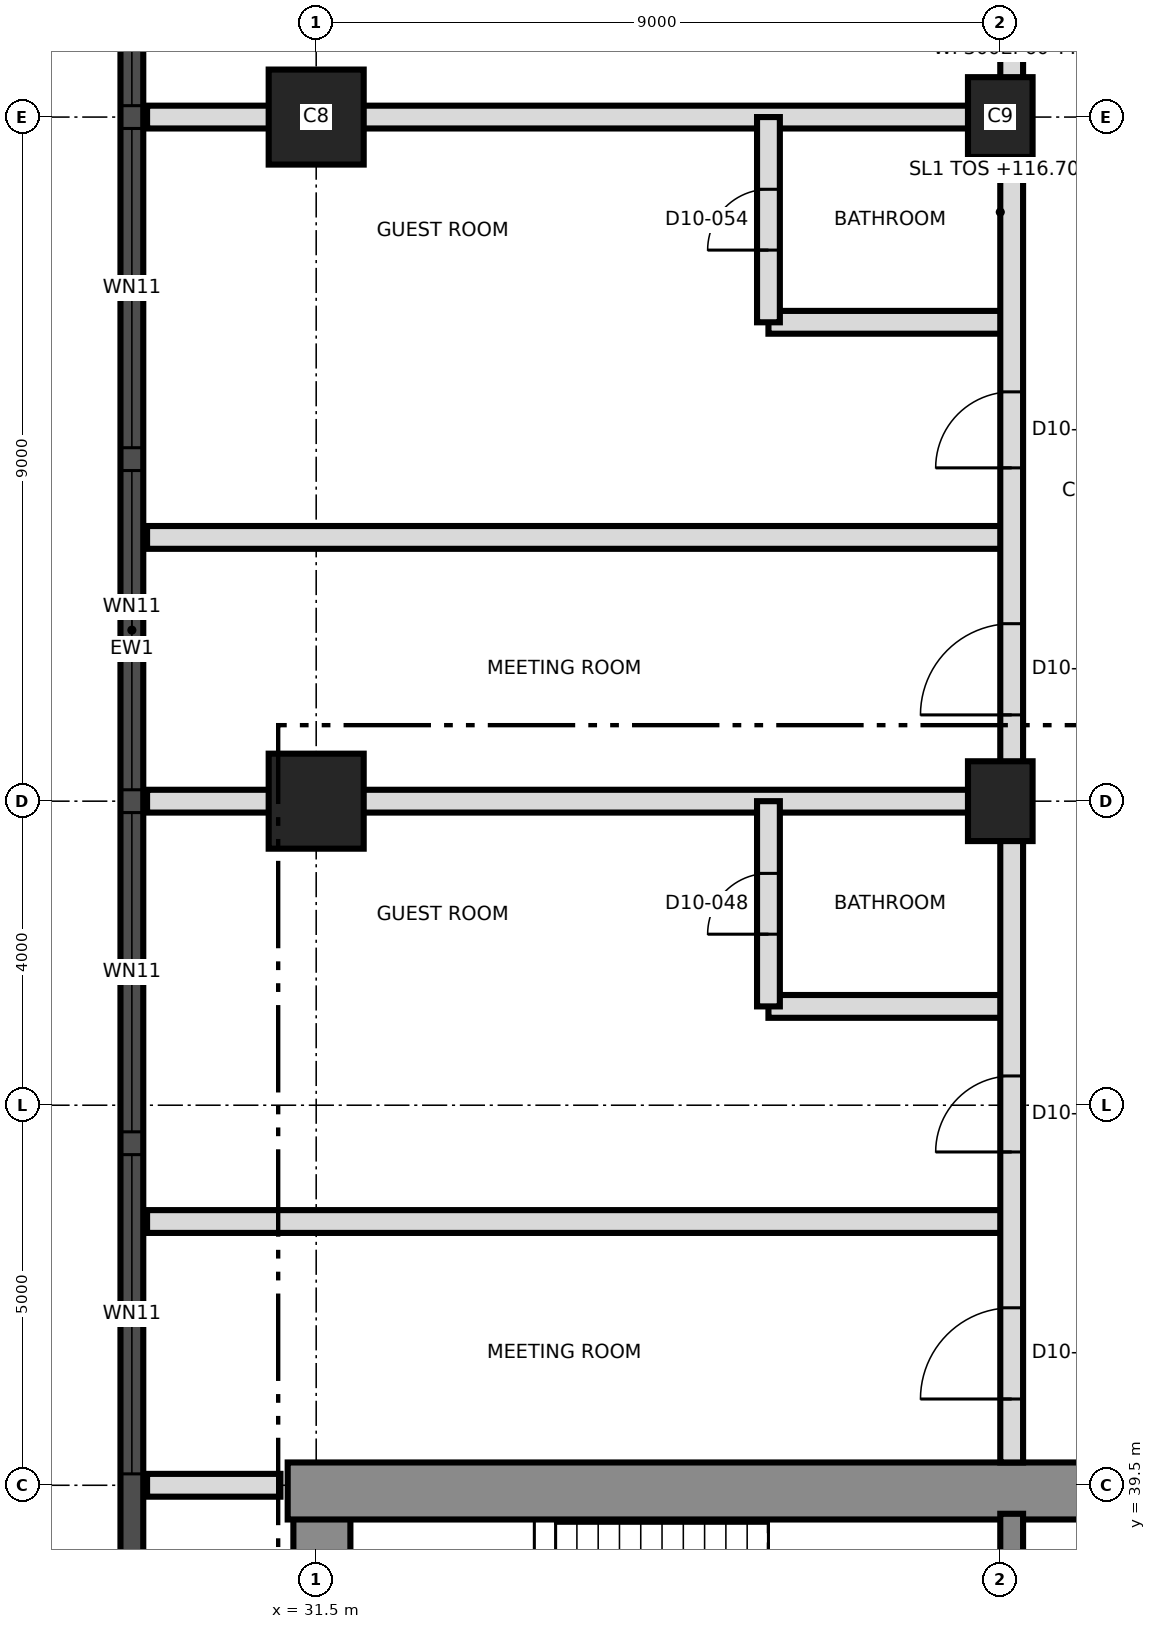
"""IFC4 building model, lengths in metres.
Left out: names, types, materials, properties, quantities, classifications, styles, units other than length and angle.
Written with IfcOpenShell. Run it as: python <this file> out.ifc"""

import sys

from ifc_helpers import new_model, si_unit, direction, frame, frame_2d, origin, origin_2d, place, context, subcontext, project, spatial, rectangle, extrude, element, fill, save


model = new_model("IFC4")
c1 = context("Model", 3, precision=1e-05, world=origin(), true_north=direction((0.0, 1.0)))
c2 = subcontext(c1, "Body", "Model", "MODEL_VIEW")
j1 = project(units=[si_unit("LENGTHUNIT", "METRE"), si_unit("PLANEANGLEUNIT", "RADIAN")], contexts=[c1])
p1 = place(None, origin())
s1 = spatial("IfcSite", under=j1, at=p1, CompositionType="ELEMENT")
p2 = place(p1, origin())
s2 = spatial("IfcBuilding", under=s1, at=p2, CompositionType="ELEMENT")
p3 = place(p2, frame((0.0, 0.0, 116.7)))
s3 = spatial("IfcBuildingStorey", under=s2, at=p3, CompositionType="ELEMENT", Elevation=116.7)
p4 = place(p3, frame((31.575, 21.875, 0.0), z_axis=(0.0, 0.0, 1.0), x_axis=(0.0, 1.0, 0.0)))
e1 = element("IfcWall", 1, at=p4, inside=s3, PredefinedType="SHEAR", context=c2, shape_type="SweptSolid", body=[
    extrude(rectangle(XDim=17.25, YDim=0.75, at=frame_2d((8.625, 0.0))), origin(), (0.0, 0.0, 1.0), 3.7),
])
p5 = place(p3, frame((31.125, 39.425, 0.0), z_axis=(0.0, 0.0, 1.0), x_axis=(1.0, 0.0, 0.0)))
e2 = element("IfcWall", 2, at=p5, inside=s3, PredefinedType="SHEAR", context=c2, shape_type="SweptSolid", body=[
    extrude(rectangle(XDim=27.0, YDim=0.75, at=frame_2d((13.5, 0.0))), origin(), (0.0, 0.0, 1.0), 3.7),
])
p6 = place(p5, frame((10.575, 0.0, 0.0)))
e3 = element("IfcOpeningElement", 3, at=p6, cuts=e2, PredefinedType="OPENING", context=c2, shape_type="SweptSolid", body=[
    extrude(rectangle(XDim=1.2, YDim=2.1, at=frame_2d((0.6, 1.05))), frame((0.0, 0.385, 0.0), z_axis=(0.0, -1.0, 0.0), x_axis=(1.0, 0.0, 0.0)), (0.0, 0.0, 1.0), 0.77),
])
p7 = place(p3, frame((40.65, 33.5, 0.0), z_axis=(0.0, 0.0, 1.0), x_axis=(0.0, 1.0, 0.0)))
e4 = element("IfcWall", 4, at=p7, inside=s3, PredefinedType="SHEAR", context=c2, shape_type="SweptSolid", body=[
    extrude(rectangle(XDim=5.625, YDim=0.3, at=frame_2d((2.812, 0.0))), origin(), (0.0, 0.0, 1.0), 3.7),
])
p8 = place(p3, frame((31.5, 48.5, 0.0), z_axis=(0.0, 0.0, 1.0), x_axis=(1.0, 0.0, 0.0)))
e5 = element("IfcColumn", 5, at=p8, inside=s3, PredefinedType="COLUMN", context=c2, shape_type="SweptSolid", body=[
    extrude(rectangle(XDim=1.25, YDim=1.25, at=origin_2d()), origin(), (0.0, 0.0, 1.0), 3.7),
])
p9 = place(p3, frame((40.5, 48.5, 0.0), z_axis=(0.0, 0.0, 1.0), x_axis=(0.0, 1.0, 0.0)))
e6 = element("IfcColumn", 6, at=p9, inside=s3, PredefinedType="COLUMN", context=c2, shape_type="SweptSolid", body=[
    extrude(rectangle(XDim=1.05, YDim=0.85, at=origin_2d()), origin(), (0.0, 0.0, 1.0), 3.7),
])
p10 = place(p3, frame((31.5, 57.5, 0.0), z_axis=(0.0, 0.0, 1.0), x_axis=(1.0, 0.0, 0.0)))
e7 = element("IfcColumn", 7, at=p10, inside=s3, PredefinedType="COLUMN", context=c2, shape_type="SweptSolid", body=[
    extrude(rectangle(XDim=1.25, YDim=1.25, at=origin_2d()), origin(), (0.0, 0.0, 1.0), 3.7),
])
p11 = place(p3, frame((40.5, 57.5, 0.0), z_axis=(0.0, 0.0, 1.0), x_axis=(0.0, 1.0, 0.0)))
e8 = element("IfcColumn", 8, at=p11, inside=s3, PredefinedType="COLUMN", context=c2, shape_type="SweptSolid", body=[
    extrude(rectangle(XDim=1.05, YDim=0.85, at=origin_2d()), origin(), (0.0, 0.0, 1.0), 3.7),
])
p12 = place(p3, frame((29.075, 66.986, 0.0), z_axis=(0.0, 0.0, 1.0), x_axis=(0.0, -1.0, 0.0)))
e9 = element("IfcWall", 9, at=p12, inside=s3, PredefinedType="SOLIDWALL", context=c2, shape_type="SweptSolid", body=[
    extrude(rectangle(XDim=32.976, YDim=0.3, at=frame_2d((16.488, 0.0))), origin(), (0.0, 0.0, 1.0), 3.4),
])
p13 = place(p12, frame((1.593, 0.0, 0.3)))
e10 = element("IfcOpeningElement", 10, at=p13, cuts=e9, PredefinedType="OPENING", context=c2, shape_type="SweptSolid", body=[
    extrude(rectangle(XDim=1.8, YDim=2.4, at=frame_2d((0.9, 1.2))), frame((0.0, 0.16, 0.0), z_axis=(0.0, -1.0, 0.0), x_axis=(1.0, 0.0, 0.0)), (0.0, 0.0, 1.0), 0.32),
])
p14 = place(p12, frame((5.136, 0.0, 0.9)))
e11 = element("IfcOpeningElement", 11, at=p14, cuts=e9, PredefinedType="OPENING", context=c2, shape_type="SweptSolid", body=[
    extrude(rectangle(XDim=4.2, YDim=1.5, at=frame_2d((2.1, 0.75))), frame((0.0, 0.16, 0.0), z_axis=(0.0, -1.0, 0.0), x_axis=(1.0, 0.0, 0.0)), (0.0, 0.0, 1.0), 0.32),
])
p15 = place(p12, frame((9.636, 0.0, 0.9)))
e12 = element("IfcOpeningElement", 12, at=p15, cuts=e9, PredefinedType="OPENING", context=c2, shape_type="SweptSolid", body=[
    extrude(rectangle(XDim=4.2, YDim=1.5, at=frame_2d((2.1, 0.75))), frame((0.0, 0.16, 0.0), z_axis=(0.0, -1.0, 0.0), x_axis=(1.0, 0.0, 0.0)), (0.0, 0.0, 1.0), 0.32),
])
p16 = place(p12, frame((14.136, 0.0, 0.9)))
e13 = element("IfcOpeningElement", 13, at=p16, cuts=e9, PredefinedType="OPENING", context=c2, shape_type="SweptSolid", body=[
    extrude(rectangle(XDim=4.2, YDim=1.5, at=frame_2d((2.1, 0.75))), frame((0.0, 0.16, 0.0), z_axis=(0.0, -1.0, 0.0), x_axis=(1.0, 0.0, 0.0)), (0.0, 0.0, 1.0), 0.32),
])
p17 = place(p12, frame((18.636, 0.0, 0.9)))
e14 = element("IfcOpeningElement", 14, at=p17, cuts=e9, PredefinedType="OPENING", context=c2, shape_type="SweptSolid", body=[
    extrude(rectangle(XDim=4.2, YDim=1.5, at=frame_2d((2.1, 0.75))), frame((0.0, 0.16, 0.0), z_axis=(0.0, -1.0, 0.0), x_axis=(1.0, 0.0, 0.0)), (0.0, 0.0, 1.0), 0.32),
])
p18 = place(p12, frame((23.136, 0.0, 0.9)))
e15 = element("IfcOpeningElement", 15, at=p18, cuts=e9, PredefinedType="OPENING", context=c2, shape_type="SweptSolid", body=[
    extrude(rectangle(XDim=4.2, YDim=1.5, at=frame_2d((2.1, 0.75))), frame((0.0, 0.16, 0.0), z_axis=(0.0, -1.0, 0.0), x_axis=(1.0, 0.0, 0.0)), (0.0, 0.0, 1.0), 0.32),
])
p19 = place(p12, frame((29.331, 0.0, 0.3)))
e16 = element("IfcOpeningElement", 16, at=p19, cuts=e9, PredefinedType="OPENING", context=c2, shape_type="SweptSolid", body=[
    extrude(rectangle(XDim=1.8, YDim=2.4, at=frame_2d((0.9, 1.2))), frame((0.0, 0.16, 0.0), z_axis=(0.0, -1.0, 0.0), x_axis=(1.0, 0.0, 0.0)), (0.0, 0.0, 1.0), 0.32),
])
p20 = place(p3, frame((29.275, 39.5, 0.0), z_axis=(0.0, 0.0, 1.0), x_axis=(1.0, 0.0, 0.0)))
e17 = element("IfcWall", 17, at=p20, inside=s3, PredefinedType="PARTITIONING", context=c2, shape_type="SweptSolid", body=[
    extrude(rectangle(XDim=1.755, YDim=0.3, at=frame_2d((0.877, 0.0))), origin(), (0.0, 0.0, 1.0), 3.4),
])
p21 = place(p3, frame((29.275, 42.97, 0.0), z_axis=(0.0, 0.0, 1.0), x_axis=(1.0, 0.0, 0.0)))
e18 = element("IfcWall", 18, at=p21, inside=s3, PredefinedType="PARTITIONING", context=c2, shape_type="SweptSolid", body=[
    extrude(rectangle(XDim=11.375, YDim=0.3, at=frame_2d((5.688, 0.0))), origin(), (0.0, 0.0, 1.0), 3.4),
])
p22 = place(p3, frame((37.45, 45.8, 0.0), z_axis=(0.0, 0.0, 1.0), x_axis=(1.0, 0.0, 0.0)))
e19 = element("IfcWall", 19, at=p22, inside=s3, PredefinedType="PARTITIONING", context=c2, shape_type="SweptSolid", body=[
    extrude(rectangle(XDim=3.2, YDim=0.3, at=frame_2d((1.6, 0.0))), origin(), (0.0, 0.0, 1.0), 3.4),
])
for number, where, z_axis, x_axis in (
    (20, (29.275, 48.5, 0.0), (0.0, 0.0, 1.0), (1.0, 0.0, 0.0)),
    (21, (29.275, 51.97, 0.0), (0.0, 0.0, 1.0), (1.0, 0.0, 0.0)),
):
    element("IfcWall", number, at=place(p3, frame(where, z_axis=z_axis, x_axis=x_axis)), inside=s3, PredefinedType="PARTITIONING", context=c2, shape_type="SweptSolid", body=[
        extrude(rectangle(XDim=11.375, YDim=0.3, at=frame_2d((5.688, 0.0))), origin(), (0.0, 0.0, 1.0), 3.4),
    ])
p23 = place(p3, frame((37.45, 54.8, 0.0), z_axis=(0.0, 0.0, 1.0), x_axis=(1.0, 0.0, 0.0)))
e22 = element("IfcWall", 22, at=p23, inside=s3, PredefinedType="PARTITIONING", context=c2, shape_type="SweptSolid", body=[
    extrude(rectangle(XDim=3.2, YDim=0.3, at=frame_2d((1.6, 0.0))), origin(), (0.0, 0.0, 1.0), 3.4),
])
p24 = place(p3, frame((29.275, 57.5, 0.0), z_axis=(0.0, 0.0, 1.0), x_axis=(1.0, 0.0, 0.0)))
e23 = element("IfcWall", 23, at=p24, inside=s3, PredefinedType="PARTITIONING", context=c2, shape_type="SweptSolid", body=[
    extrude(rectangle(XDim=11.375, YDim=0.3, at=frame_2d((5.688, 0.0))), origin(), (0.0, 0.0, 1.0), 3.4),
])
p25 = place(p3, frame((37.45, 45.8, 0.0), z_axis=(0.0, 0.0, 1.0), x_axis=(0.0, 1.0, 0.0)))
e24 = element("IfcWall", 24, at=p25, inside=s3, PredefinedType="PARTITIONING", context=c2, shape_type="SweptSolid", body=[
    extrude(rectangle(XDim=2.7, YDim=0.3, at=frame_2d((1.35, 0.0))), origin(), (0.0, 0.0, 1.0), 3.4),
])
p26 = place(p25, frame((0.95, 0.0, 0.0)))
e25 = element("IfcOpeningElement", 25, at=p26, cuts=e24, PredefinedType="OPENING", context=c2, shape_type="SweptSolid", body=[
    extrude(rectangle(XDim=0.8, YDim=2.1, at=frame_2d((0.4, 1.05))), frame((0.0, 0.16, 0.0), z_axis=(0.0, -1.0, 0.0), x_axis=(1.0, 0.0, 0.0)), (0.0, 0.0, 1.0), 0.32),
])
p27 = place(p3, frame((37.45, 54.8, 0.0), z_axis=(0.0, 0.0, 1.0), x_axis=(0.0, 1.0, 0.0)))
e26 = element("IfcWall", 26, at=p27, inside=s3, PredefinedType="PARTITIONING", context=c2, shape_type="SweptSolid", body=[
    extrude(rectangle(XDim=2.7, YDim=0.3, at=frame_2d((1.35, 0.0))), origin(), (0.0, 0.0, 1.0), 3.4),
])
p28 = place(p27, frame((0.95, 0.0, 0.0)))
e27 = element("IfcOpeningElement", 27, at=p28, cuts=e26, PredefinedType="OPENING", context=c2, shape_type="SweptSolid", body=[
    extrude(rectangle(XDim=0.8, YDim=2.1, at=frame_2d((0.4, 1.05))), frame((0.0, 0.16, 0.0), z_axis=(0.0, -1.0, 0.0), x_axis=(1.0, 0.0, 0.0)), (0.0, 0.0, 1.0), 0.32),
])
p29 = place(p3, frame((40.65, 39.8, 0.0), z_axis=(0.0, 0.0, 1.0), x_axis=(0.0, 1.0, 0.0)))
e28 = element("IfcWall", 28, at=p29, inside=s3, PredefinedType="PARTITIONING", context=c2, shape_type="SweptSolid", body=[
    extrude(rectangle(XDim=37.2, YDim=0.3, at=frame_2d((18.6, 0.0))), origin(), (0.0, 0.0, 1.0), 3.4),
])
p30 = place(p29, frame((0.835, 0.0, 0.0)))
e29 = element("IfcOpeningElement", 29, at=p30, cuts=e28, PredefinedType="OPENING", context=c2, shape_type="SweptSolid", body=[
    extrude(rectangle(XDim=1.2, YDim=2.1, at=frame_2d((0.6, 1.05))), frame((0.0, 0.16, 0.0), z_axis=(0.0, -1.0, 0.0), x_axis=(1.0, 0.0, 0.0)), (0.0, 0.0, 1.0), 0.32),
])
p31 = place(p29, frame((4.085, 0.0, 0.0)))
e30 = element("IfcOpeningElement", 30, at=p31, cuts=e28, PredefinedType="OPENING", context=c2, shape_type="SweptSolid", body=[
    extrude(rectangle(XDim=1.0, YDim=2.1, at=frame_2d((0.5, 1.05))), frame((0.0, 0.16, 0.0), z_axis=(0.0, -1.0, 0.0), x_axis=(1.0, 0.0, 0.0)), (0.0, 0.0, 1.0), 0.32),
])
p32 = place(p29, frame((9.835, 0.0, 0.0)))
e31 = element("IfcOpeningElement", 31, at=p32, cuts=e28, PredefinedType="OPENING", context=c2, shape_type="SweptSolid", body=[
    extrude(rectangle(XDim=1.2, YDim=2.1, at=frame_2d((0.6, 1.05))), frame((0.0, 0.16, 0.0), z_axis=(0.0, -1.0, 0.0), x_axis=(1.0, 0.0, 0.0)), (0.0, 0.0, 1.0), 0.32),
])
p33 = place(p29, frame((13.085, 0.0, 0.0)))
e32 = element("IfcOpeningElement", 32, at=p33, cuts=e28, PredefinedType="OPENING", context=c2, shape_type="SweptSolid", body=[
    extrude(rectangle(XDim=1.0, YDim=2.1, at=frame_2d((0.5, 1.05))), frame((0.0, 0.16, 0.0), z_axis=(0.0, -1.0, 0.0), x_axis=(1.0, 0.0, 0.0)), (0.0, 0.0, 1.0), 0.32),
])
p34 = place(p29, frame((21.2, 0.0, 0.0)))
e33 = element("IfcOpeningElement", 33, at=p34, cuts=e28, PredefinedType="OPENING", context=c2, shape_type="SweptSolid", body=[
    extrude(rectangle(XDim=1.0, YDim=2.4, at=frame_2d((0.5, 1.2))), frame((0.0, 0.16, 0.0), z_axis=(0.0, -1.0, 0.0), x_axis=(1.0, 0.0, 0.0)), (0.0, 0.0, 1.0), 0.32),
])
p35 = place(p14, origin())
e34 = element("IfcWindow", 34, at=p35, inside=s3, PartitioningType="SINGLE_PANEL", PredefinedType="WINDOW", context=c2, shape_type="SweptSolid", body=[
    extrude(rectangle(XDim=4.2, YDim=1.5, at=frame_2d((2.1, 0.75))), frame((0.0, 0.03, 0.0), z_axis=(0.0, -1.0, 0.0), x_axis=(1.0, 0.0, 0.0)), (0.0, 0.0, 1.0), 0.06),
])
fill(e11, e34)
p36 = place(p15, origin())
e35 = element("IfcWindow", 35, at=p36, inside=s3, PartitioningType="SINGLE_PANEL", PredefinedType="WINDOW", context=c2, shape_type="SweptSolid", body=[
    extrude(rectangle(XDim=4.2, YDim=1.5, at=frame_2d((2.1, 0.75))), frame((0.0, 0.03, 0.0), z_axis=(0.0, -1.0, 0.0), x_axis=(1.0, 0.0, 0.0)), (0.0, 0.0, 1.0), 0.06),
])
fill(e12, e35)
p37 = place(p16, origin())
e36 = element("IfcWindow", 36, at=p37, inside=s3, PartitioningType="SINGLE_PANEL", PredefinedType="WINDOW", context=c2, shape_type="SweptSolid", body=[
    extrude(rectangle(XDim=4.2, YDim=1.5, at=frame_2d((2.1, 0.75))), frame((0.0, 0.03, 0.0), z_axis=(0.0, -1.0, 0.0), x_axis=(1.0, 0.0, 0.0)), (0.0, 0.0, 1.0), 0.06),
])
fill(e13, e36)
p38 = place(p17, origin())
e37 = element("IfcWindow", 37, at=p38, inside=s3, PartitioningType="SINGLE_PANEL", PredefinedType="WINDOW", context=c2, shape_type="SweptSolid", body=[
    extrude(rectangle(XDim=4.2, YDim=1.5, at=frame_2d((2.1, 0.75))), frame((0.0, 0.03, 0.0), z_axis=(0.0, -1.0, 0.0), x_axis=(1.0, 0.0, 0.0)), (0.0, 0.0, 1.0), 0.06),
])
fill(e14, e37)
p39 = place(p18, origin())
e38 = element("IfcWindow", 38, at=p39, inside=s3, PartitioningType="SINGLE_PANEL", PredefinedType="WINDOW", context=c2, shape_type="SweptSolid", body=[
    extrude(rectangle(XDim=4.2, YDim=1.5, at=frame_2d((2.1, 0.75))), frame((0.0, 0.03, 0.0), z_axis=(0.0, -1.0, 0.0), x_axis=(1.0, 0.0, 0.0)), (0.0, 0.0, 1.0), 0.06),
])
fill(e15, e38)
p40 = place(p30, origin())
e39 = element("IfcDoor", 39, at=p40, inside=s3, OperationType="SINGLE_SWING_LEFT", PredefinedType="DOOR", context=c2, shape_type="SweptSolid", body=[
    extrude(rectangle(XDim=1.2, YDim=2.1, at=frame_2d((0.6, 1.05))), frame((0.0, 0.025, 0.0), z_axis=(0.0, -1.0, 0.0), x_axis=(1.0, 0.0, 0.0)), (0.0, 0.0, 1.0), 0.05),
])
fill(e29, e39)
p41 = place(p26, origin())
e40 = element("IfcDoor", 40, at=p41, inside=s3, OperationType="SINGLE_SWING_RIGHT", PredefinedType="DOOR", context=c2, shape_type="SweptSolid", body=[
    extrude(rectangle(XDim=0.8, YDim=2.1, at=frame_2d((0.4, 1.05))), frame((0.0, 0.025, 0.0), z_axis=(0.0, -1.0, 0.0), x_axis=(1.0, 0.0, 0.0)), (0.0, 0.0, 1.0), 0.05),
])
fill(e25, e40)
p42 = place(p31, origin())
e41 = element("IfcDoor", 41, at=p42, inside=s3, OperationType="SINGLE_SWING_LEFT", PredefinedType="DOOR", context=c2, shape_type="SweptSolid", body=[
    extrude(rectangle(XDim=1.0, YDim=2.1, at=frame_2d((0.5, 1.05))), frame((0.0, 0.025, 0.0), z_axis=(0.0, -1.0, 0.0), x_axis=(1.0, 0.0, 0.0)), (0.0, 0.0, 1.0), 0.05),
])
fill(e30, e41)
p43 = place(p32, origin())
e42 = element("IfcDoor", 42, at=p43, inside=s3, OperationType="SINGLE_SWING_LEFT", PredefinedType="DOOR", context=c2, shape_type="SweptSolid", body=[
    extrude(rectangle(XDim=1.2, YDim=2.1, at=frame_2d((0.6, 1.05))), frame((0.0, 0.025, 0.0), z_axis=(0.0, -1.0, 0.0), x_axis=(1.0, 0.0, 0.0)), (0.0, 0.0, 1.0), 0.05),
])
fill(e31, e42)
p44 = place(p28, origin())
e43 = element("IfcDoor", 43, at=p44, inside=s3, OperationType="SINGLE_SWING_RIGHT", PredefinedType="DOOR", context=c2, shape_type="SweptSolid", body=[
    extrude(rectangle(XDim=0.8, YDim=2.1, at=frame_2d((0.4, 1.05))), frame((0.0, 0.025, 0.0), z_axis=(0.0, -1.0, 0.0), x_axis=(1.0, 0.0, 0.0)), (0.0, 0.0, 1.0), 0.05),
])
fill(e27, e43)
p45 = place(p33, origin())
e44 = element("IfcDoor", 44, at=p45, inside=s3, OperationType="SINGLE_SWING_LEFT", PredefinedType="DOOR", context=c2, shape_type="SweptSolid", body=[
    extrude(rectangle(XDim=1.0, YDim=2.1, at=frame_2d((0.5, 1.05))), frame((0.0, 0.025, 0.0), z_axis=(0.0, -1.0, 0.0), x_axis=(1.0, 0.0, 0.0)), (0.0, 0.0, 1.0), 0.05),
])
fill(e32, e44)
save(model, sys.argv[1])
